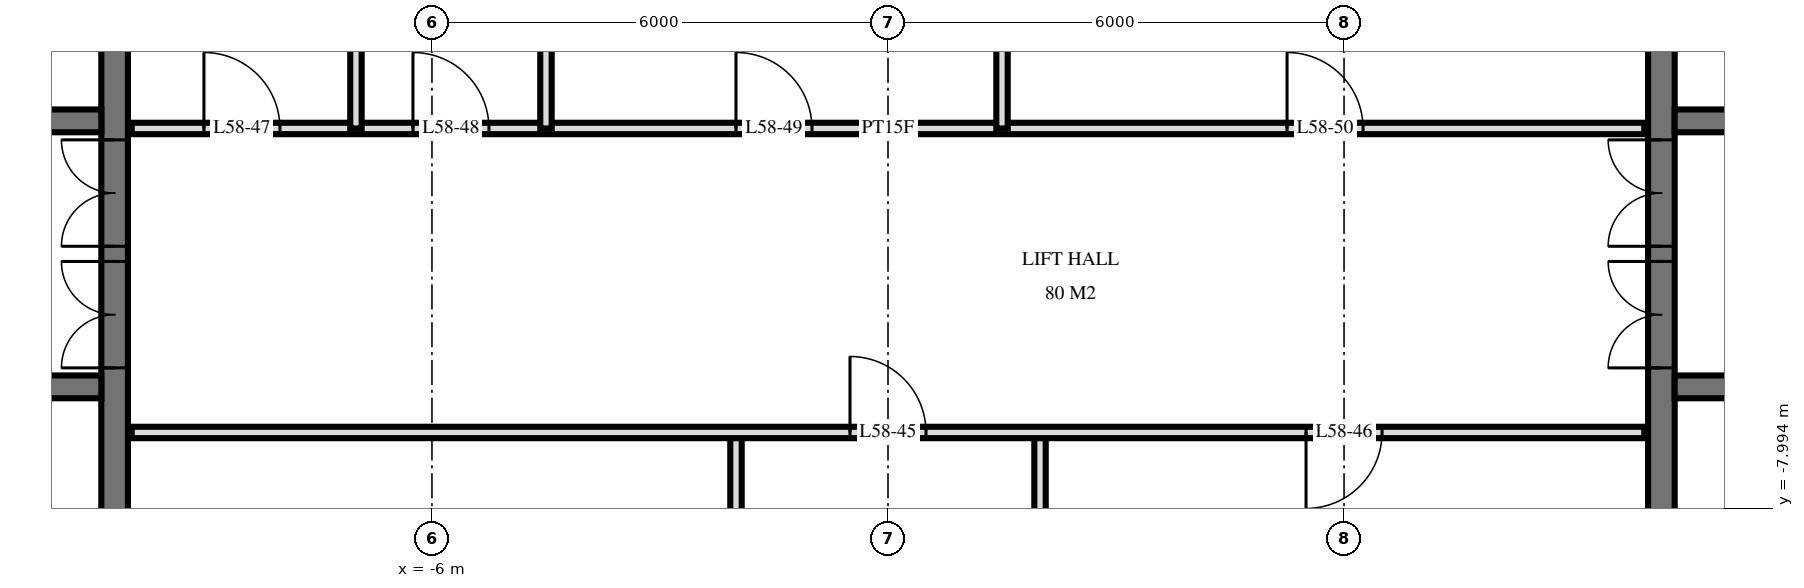
"""IFC4 building model, lengths in metres.
Left out: names, types, materials, properties, quantities, classifications, styles, units other than length and angle.
Written with IfcOpenShell. Run it as: python <this file> out.ifc"""

import sys

from ifc_helpers import new_model, si_unit, direction, frame, frame_2d, origin, place, context, subcontext, project, spatial, rectangle, extrude, element, fill, save


model = new_model("IFC4")
c1 = context("Model", 3, precision=1e-05, world=origin(), true_north=direction((0.0, 1.0)))
c2 = subcontext(c1, "Body", "Model", "MODEL_VIEW")
j1 = project(units=[si_unit("LENGTHUNIT", "METRE"), si_unit("PLANEANGLEUNIT", "RADIAN")], contexts=[c1])
p1 = place(None, origin())
s1 = spatial("IfcSite", under=j1, at=p1, CompositionType="ELEMENT")
p2 = place(p1, origin())
s2 = spatial("IfcBuilding", under=s1, at=p2, CompositionType="ELEMENT")
p3 = place(p2, frame((0.0, 0.0, 222.1)))
s3 = spatial("IfcBuildingStorey", under=s2, at=p3, CompositionType="ELEMENT", Elevation=222.1)
p4 = place(p3, frame((-10.175, -14.55, 0.0), z_axis=(0.0, 0.0, 1.0), x_axis=(0.0, 1.0, 0.0)))
e1 = element("IfcWall", 1, at=p4, inside=s3, PredefinedType="SHEAR", context=c2, shape_type="SweptSolid", body=[
    extrude(rectangle(XDim=14.1, YDim=0.35, at=frame_2d((7.05, 0.0))), origin(), (0.0, 0.0, 1.0), 3.5),
])
p5 = place(p4, frame((8.4, 0.0, 0.0)))
e2 = element("IfcOpeningElement", 2, at=p5, cuts=e1, PredefinedType="OPENING", context=c2, shape_type="SweptSolid", body=[
    extrude(rectangle(XDim=1.4, YDim=2.4, at=frame_2d((0.7, 1.2))), frame((0.0, 0.185, 0.0), z_axis=(0.0, -1.0, 0.0), x_axis=(1.0, 0.0, 0.0)), (0.0, 0.0, 1.0), 0.37),
])
p6 = place(p4, frame((10.0, 0.0, 0.0)))
e3 = element("IfcOpeningElement", 3, at=p6, cuts=e1, PredefinedType="OPENING", context=c2, shape_type="SweptSolid", body=[
    extrude(rectangle(XDim=1.4, YDim=2.4, at=frame_2d((0.7, 1.2))), frame((0.0, 0.185, 0.0), z_axis=(0.0, -1.0, 0.0), x_axis=(1.0, 0.0, 0.0)), (0.0, 0.0, 1.0), 0.37),
])
p7 = place(p4, frame((4.0, 0.0, 0.0)))
e4 = element("IfcOpeningElement", 4, at=p7, cuts=e1, PredefinedType="OPENING", context=c2, shape_type="SweptSolid", body=[
    extrude(rectangle(XDim=1.2, YDim=2.1, at=frame_2d((0.6, 1.05))), frame((0.0, 0.185, 0.0), z_axis=(0.0, -1.0, 0.0), x_axis=(1.0, 0.0, 0.0)), (0.0, 0.0, 1.0), 0.37),
])
p8 = place(p3, frame((-24.05, -2.9, 0.0), z_axis=(0.0, 0.0, 1.0), x_axis=(1.0, 0.0, 0.0)))
e5 = element("IfcWall", 5, at=p8, inside=s3, PredefinedType="SHEAR", context=c2, shape_type="SweptSolid", body=[
    extrude(rectangle(XDim=13.7, YDim=0.3, at=frame_2d((6.85, 0.0))), origin(), (0.0, 0.0, 1.0), 3.5),
])
p9 = place(p8, frame((0.55, 0.0, 0.0)))
e6 = element("IfcOpeningElement", 6, at=p9, cuts=e5, PredefinedType="OPENING", context=c2, shape_type="SweptSolid", body=[
    extrude(rectangle(XDim=1.1, YDim=2.1, at=frame_2d((0.55, 1.05))), frame((0.0, 0.16, 0.0), z_axis=(0.0, -1.0, 0.0), x_axis=(1.0, 0.0, 0.0)), (0.0, 0.0, 1.0), 0.32),
])
p10 = place(p8, frame((5.9, 0.0, 0.0)))
e7 = element("IfcOpeningElement", 7, at=p10, cuts=e5, PredefinedType="OPENING", context=c2, shape_type="SweptSolid", body=[
    extrude(rectangle(XDim=0.9, YDim=2.1, at=frame_2d((0.45, 1.05))), frame((0.0, 0.16, 0.0), z_axis=(0.0, -1.0, 0.0), x_axis=(1.0, 0.0, 0.0)), (0.0, 0.0, 1.0), 0.32),
])
p11 = place(p8, frame((11.85, 0.0, 0.0)))
e8 = element("IfcOpeningElement", 8, at=p11, cuts=e5, PredefinedType="OPENING", context=c2, shape_type="SweptSolid", body=[
    extrude(rectangle(XDim=1.0, YDim=2.1, at=frame_2d((0.5, 1.05))), frame((0.0, 0.16, 0.0), z_axis=(0.0, -1.0, 0.0), x_axis=(1.0, 0.0, 0.0)), (0.0, 0.0, 1.0), 0.32),
])
p12 = place(p8, frame((9.312, 0.0, 0.0)))
e9 = element("IfcOpeningElement", 9, at=p12, cuts=e5, PredefinedType="OPENING", context=c2, shape_type="SweptSolid", body=[
    extrude(rectangle(XDim=1.0, YDim=2.1, at=frame_2d((0.5, 1.05))), frame((0.0, 0.16, 0.0), z_axis=(0.0, -1.0, 0.0), x_axis=(1.0, 0.0, 0.0)), (0.0, 0.0, 1.0), 0.32),
])
p13 = place(p8, frame((7.887, 0.0, 0.0)))
e10 = element("IfcOpeningElement", 10, at=p13, cuts=e5, PredefinedType="OPENING", context=c2, shape_type="SweptSolid", body=[
    extrude(rectangle(XDim=1.0, YDim=2.1, at=frame_2d((0.5, 1.05))), frame((0.0, 0.16, 0.0), z_axis=(0.0, -1.0, 0.0), x_axis=(1.0, 0.0, 0.0)), (0.0, 0.0, 1.0), 0.32),
])
p14 = place(p8, frame((3.0, 0.0, 0.0)))
e11 = element("IfcOpeningElement", 11, at=p14, cuts=e5, PredefinedType="OPENING", context=c2, shape_type="SweptSolid", body=[
    extrude(rectangle(XDim=1.0, YDim=2.1, at=frame_2d((0.5, 1.05))), frame((0.0, 0.16, 0.0), z_axis=(0.0, -1.0, 0.0), x_axis=(1.0, 0.0, 0.0)), (0.0, 0.0, 1.0), 0.32),
])
p15 = place(p3, frame((-24.05, -6.4, 0.0), z_axis=(0.0, 0.0, 1.0), x_axis=(1.0, 0.0, 0.0)))
e12 = element("IfcWall", 12, at=p15, inside=s3, PredefinedType="SHEAR", context=c2, shape_type="SweptSolid", body=[
    extrude(rectangle(XDim=13.7, YDim=0.3, at=frame_2d((6.85, 0.0))), origin(), (0.0, 0.0, 1.0), 3.5),
])
p16 = place(p15, frame((0.55, 0.0, 0.0)))
e13 = element("IfcOpeningElement", 13, at=p16, cuts=e12, PredefinedType="OPENING", context=c2, shape_type="SweptSolid", body=[
    extrude(rectangle(XDim=1.1, YDim=2.1, at=frame_2d((0.55, 1.05))), frame((0.0, 0.16, 0.0), z_axis=(0.0, -1.0, 0.0), x_axis=(1.0, 0.0, 0.0)), (0.0, 0.0, 1.0), 0.32),
])
p17 = place(p15, frame((5.8, 0.0, 0.0)))
e14 = element("IfcOpeningElement", 14, at=p17, cuts=e12, PredefinedType="OPENING", context=c2, shape_type="SweptSolid", body=[
    extrude(rectangle(XDim=1.1, YDim=2.1, at=frame_2d((0.55, 1.05))), frame((0.0, 0.16, 0.0), z_axis=(0.0, -1.0, 0.0), x_axis=(1.0, 0.0, 0.0)), (0.0, 0.0, 1.0), 0.32),
])
p18 = place(p3, frame((10.175, -14.55, 0.0), z_axis=(0.0, 0.0, 1.0), x_axis=(0.0, 1.0, 0.0)))
e15 = element("IfcWall", 15, at=p18, inside=s3, PredefinedType="SHEAR", context=c2, shape_type="SweptSolid", body=[
    extrude(rectangle(XDim=14.1, YDim=0.35, at=frame_2d((7.05, 0.0))), origin(), (0.0, 0.0, 1.0), 3.5),
])
p19 = place(p18, frame((8.4, 0.0, 0.0)))
e16 = element("IfcOpeningElement", 16, at=p19, cuts=e15, PredefinedType="OPENING", context=c2, shape_type="SweptSolid", body=[
    extrude(rectangle(XDim=1.4, YDim=2.4, at=frame_2d((0.7, 1.2))), frame((0.0, 0.185, 0.0), z_axis=(0.0, -1.0, 0.0), x_axis=(1.0, 0.0, 0.0)), (0.0, 0.0, 1.0), 0.37),
])
p20 = place(p18, frame((10.0, 0.0, 0.0)))
e17 = element("IfcOpeningElement", 17, at=p20, cuts=e15, PredefinedType="OPENING", context=c2, shape_type="SweptSolid", body=[
    extrude(rectangle(XDim=1.4, YDim=2.4, at=frame_2d((0.7, 1.2))), frame((0.0, 0.185, 0.0), z_axis=(0.0, -1.0, 0.0), x_axis=(1.0, 0.0, 0.0)), (0.0, 0.0, 1.0), 0.37),
])
p21 = place(p18, frame((4.0, 0.0, 0.0)))
e18 = element("IfcOpeningElement", 18, at=p21, cuts=e15, PredefinedType="OPENING", context=c2, shape_type="SweptSolid", body=[
    extrude(rectangle(XDim=1.2, YDim=2.1, at=frame_2d((0.6, 1.05))), frame((0.0, 0.185, 0.0), z_axis=(0.0, -1.0, 0.0), x_axis=(1.0, 0.0, 0.0)), (0.0, 0.0, 1.0), 0.37),
])
p22 = place(p3, frame((10.35, -2.9, 0.0), z_axis=(0.0, 0.0, 1.0), x_axis=(1.0, 0.0, 0.0)))
e19 = element("IfcWall", 19, at=p22, inside=s3, PredefinedType="SHEAR", context=c2, shape_type="SweptSolid", body=[
    extrude(rectangle(XDim=13.7, YDim=0.3, at=frame_2d((6.85, 0.0))), origin(), (0.0, 0.0, 1.0), 3.5),
])
p23 = place(p22, frame((12.05, 0.0, 0.0)))
e20 = element("IfcOpeningElement", 20, at=p23, cuts=e19, PredefinedType="OPENING", context=c2, shape_type="SweptSolid", body=[
    extrude(rectangle(XDim=1.1, YDim=2.1, at=frame_2d((0.55, 1.05))), frame((0.0, 0.16, 0.0), z_axis=(0.0, -1.0, 0.0), x_axis=(1.0, 0.0, 0.0)), (0.0, 0.0, 1.0), 0.32),
])
p24 = place(p22, frame((6.9, 0.0, 0.0)))
e21 = element("IfcOpeningElement", 21, at=p24, cuts=e19, PredefinedType="OPENING", context=c2, shape_type="SweptSolid", body=[
    extrude(rectangle(XDim=0.9, YDim=2.1, at=frame_2d((0.45, 1.05))), frame((0.0, 0.16, 0.0), z_axis=(0.0, -1.0, 0.0), x_axis=(1.0, 0.0, 0.0)), (0.0, 0.0, 1.0), 0.32),
])
p25 = place(p22, frame((0.85, 0.0, 0.0)))
e22 = element("IfcOpeningElement", 22, at=p25, cuts=e19, PredefinedType="OPENING", context=c2, shape_type="SweptSolid", body=[
    extrude(rectangle(XDim=1.0, YDim=2.1, at=frame_2d((0.5, 1.05))), frame((0.0, 0.16, 0.0), z_axis=(0.0, -1.0, 0.0), x_axis=(1.0, 0.0, 0.0)), (0.0, 0.0, 1.0), 0.32),
])
p26 = place(p22, frame((3.387, 0.0, 0.0)))
e23 = element("IfcOpeningElement", 23, at=p26, cuts=e19, PredefinedType="OPENING", context=c2, shape_type="SweptSolid", body=[
    extrude(rectangle(XDim=1.0, YDim=2.1, at=frame_2d((0.5, 1.05))), frame((0.0, 0.16, 0.0), z_axis=(0.0, -1.0, 0.0), x_axis=(1.0, 0.0, 0.0)), (0.0, 0.0, 1.0), 0.32),
])
p27 = place(p22, frame((4.812, 0.0, 0.0)))
e24 = element("IfcOpeningElement", 24, at=p27, cuts=e19, PredefinedType="OPENING", context=c2, shape_type="SweptSolid", body=[
    extrude(rectangle(XDim=1.0, YDim=2.1, at=frame_2d((0.5, 1.05))), frame((0.0, 0.16, 0.0), z_axis=(0.0, -1.0, 0.0), x_axis=(1.0, 0.0, 0.0)), (0.0, 0.0, 1.0), 0.32),
])
p28 = place(p22, frame((9.7, 0.0, 0.0)))
e25 = element("IfcOpeningElement", 25, at=p28, cuts=e19, PredefinedType="OPENING", context=c2, shape_type="SweptSolid", body=[
    extrude(rectangle(XDim=1.0, YDim=2.1, at=frame_2d((0.5, 1.05))), frame((0.0, 0.16, 0.0), z_axis=(0.0, -1.0, 0.0), x_axis=(1.0, 0.0, 0.0)), (0.0, 0.0, 1.0), 0.32),
])
p29 = place(p3, frame((10.35, -6.4, 0.0), z_axis=(0.0, 0.0, 1.0), x_axis=(1.0, 0.0, 0.0)))
e26 = element("IfcWall", 26, at=p29, inside=s3, PredefinedType="SHEAR", context=c2, shape_type="SweptSolid", body=[
    extrude(rectangle(XDim=13.7, YDim=0.3, at=frame_2d((6.85, 0.0))), origin(), (0.0, 0.0, 1.0), 3.5),
])
p30 = place(p29, frame((12.05, 0.0, 0.0)))
e27 = element("IfcOpeningElement", 27, at=p30, cuts=e26, PredefinedType="OPENING", context=c2, shape_type="SweptSolid", body=[
    extrude(rectangle(XDim=1.1, YDim=2.1, at=frame_2d((0.55, 1.05))), frame((0.0, 0.16, 0.0), z_axis=(0.0, -1.0, 0.0), x_axis=(1.0, 0.0, 0.0)), (0.0, 0.0, 1.0), 0.32),
])
p31 = place(p29, frame((6.8, 0.0, 0.0)))
e28 = element("IfcOpeningElement", 28, at=p31, cuts=e26, PredefinedType="OPENING", context=c2, shape_type="SweptSolid", body=[
    extrude(rectangle(XDim=1.1, YDim=2.1, at=frame_2d((0.55, 1.05))), frame((0.0, 0.16, 0.0), z_axis=(0.0, -1.0, 0.0), x_axis=(1.0, 0.0, 0.0)), (0.0, 0.0, 1.0), 0.32),
])
p32 = place(p3, frame((2.0, -11.0, 0.0), z_axis=(0.0, 0.0, 1.0), x_axis=(0.0, 1.0, 0.0)))
e29 = element("IfcWall", 29, at=p32, inside=s3, PredefinedType="PARTITIONING", context=c2, shape_type="SweptSolid", body=[
    extrude(rectangle(XDim=4.0, YDim=0.15, at=frame_2d((2.0, 0.0))), origin(), (0.0, 0.0, 1.0), 3.22),
])
p33 = place(p3, frame((1.5, -3.0, 0.0), z_axis=(0.0, 0.0, 1.0), x_axis=(0.0, 1.0, 0.0)))
e30 = element("IfcWall", 30, at=p33, inside=s3, PredefinedType="PARTITIONING", context=c2, shape_type="SweptSolid", body=[
    extrude(rectangle(XDim=4.02, YDim=0.15, at=frame_2d((2.01, 0.0))), origin(), (0.0, 0.0, 1.0), 3.22),
])
p34 = place(p3, frame((-2.0, -11.0, 0.0), z_axis=(0.0, 0.0, 1.0), x_axis=(0.0, 1.0, 0.0)))
e31 = element("IfcWall", 31, at=p34, inside=s3, PredefinedType="PARTITIONING", context=c2, shape_type="SweptSolid", body=[
    extrude(rectangle(XDim=4.0, YDim=0.15, at=frame_2d((2.0, 0.0))), origin(), (0.0, 0.0, 1.0), 3.22),
])
for number, where, z_axis, x_axis in (
    (32, (-4.5, -3.0, 0.0), (0.0, 0.0, 1.0), (0.0, 1.0, 0.0)),
    (33, (-7.0, -3.0, 0.0), (0.0, 0.0, 1.0), (0.0, 1.0, 0.0)),
):
    element("IfcWall", number, at=place(p3, frame(where, z_axis=z_axis, x_axis=x_axis)), inside=s3, PredefinedType="PLUMBINGWALL", context=c2, shape_type="SweptSolid", body=[
        extrude(rectangle(XDim=4.02, YDim=0.15, at=frame_2d((2.01, 0.0))), origin(), (0.0, 0.0, 1.0), 3.22),
    ])
p35 = place(p3, frame((-9.95, -7.0, 0.0), z_axis=(0.0, 0.0, 1.0), x_axis=(1.0, 0.0, 0.0)))
e34 = element("IfcWall", 34, at=p35, inside=s3, PredefinedType="PARTITIONING", context=c2, shape_type="SweptSolid", body=[
    extrude(rectangle(XDim=19.9, YDim=0.15, at=frame_2d((9.95, 0.0))), origin(), (0.0, 0.0, 1.0), 3.22),
])
p36 = place(p35, frame((9.45, 0.0, 0.0)))
e35 = element("IfcOpeningElement", 35, at=p36, cuts=e34, PredefinedType="OPENING", context=c2, shape_type="SweptSolid", body=[
    extrude(rectangle(XDim=1.0, YDim=2.1, at=frame_2d((0.5, 1.05))), frame((0.0, 0.085, 0.0), z_axis=(0.0, -1.0, 0.0), x_axis=(1.0, 0.0, 0.0)), (0.0, 0.0, 1.0), 0.17),
])
p37 = place(p35, frame((15.45, 0.0, 0.0)))
e36 = element("IfcOpeningElement", 36, at=p37, cuts=e34, PredefinedType="OPENING", context=c2, shape_type="SweptSolid", body=[
    extrude(rectangle(XDim=1.0, YDim=2.1, at=frame_2d((0.5, 1.05))), frame((0.0, 0.085, 0.0), z_axis=(0.0, -1.0, 0.0), x_axis=(1.0, 0.0, 0.0)), (0.0, 0.0, 1.0), 0.17),
])
p38 = place(p3, frame((-9.95, -3.0, 0.0), z_axis=(0.0, 0.0, 1.0), x_axis=(1.0, 0.0, 0.0)))
e37 = element("IfcWall", 37, at=p38, inside=s3, PredefinedType="PARTITIONING", context=c2, shape_type="SweptSolid", body=[
    extrude(rectangle(XDim=19.9, YDim=0.15, at=frame_2d((9.95, 0.0))), origin(), (0.0, 0.0, 1.0), 3.22),
])
p39 = place(p38, frame((0.95, 0.0, 0.0)))
e38 = element("IfcOpeningElement", 38, at=p39, cuts=e37, PredefinedType="OPENING", context=c2, shape_type="SweptSolid", body=[
    extrude(rectangle(XDim=1.0, YDim=2.1, at=frame_2d((0.5, 1.05))), frame((0.0, 0.085, 0.0), z_axis=(0.0, -1.0, 0.0), x_axis=(1.0, 0.0, 0.0)), (0.0, 0.0, 1.0), 0.17),
])
p40 = place(p38, frame((3.7, 0.0, 0.0)))
e39 = element("IfcOpeningElement", 39, at=p40, cuts=e37, PredefinedType="OPENING", context=c2, shape_type="SweptSolid", body=[
    extrude(rectangle(XDim=1.0, YDim=2.1, at=frame_2d((0.5, 1.05))), frame((0.0, 0.085, 0.0), z_axis=(0.0, -1.0, 0.0), x_axis=(1.0, 0.0, 0.0)), (0.0, 0.0, 1.0), 0.17),
])
p41 = place(p38, frame((7.95, 0.0, 0.0)))
e40 = element("IfcOpeningElement", 40, at=p41, cuts=e37, PredefinedType="OPENING", context=c2, shape_type="SweptSolid", body=[
    extrude(rectangle(XDim=1.0, YDim=2.1, at=frame_2d((0.5, 1.05))), frame((0.0, 0.085, 0.0), z_axis=(0.0, -1.0, 0.0), x_axis=(1.0, 0.0, 0.0)), (0.0, 0.0, 1.0), 0.17),
])
p42 = place(p38, frame((15.2, 0.0, 0.0)))
e41 = element("IfcOpeningElement", 41, at=p42, cuts=e37, PredefinedType="OPENING", context=c2, shape_type="SweptSolid", body=[
    extrude(rectangle(XDim=1.0, YDim=2.1, at=frame_2d((0.5, 1.05))), frame((0.0, 0.085, 0.0), z_axis=(0.0, -1.0, 0.0), x_axis=(1.0, 0.0, 0.0)), (0.0, 0.0, 1.0), 0.17),
])
p43 = place(p5, origin())
e42 = element("IfcDoor", 42, at=p43, inside=s3, OperationType="DOUBLE_DOOR_SINGLE_SWING", PredefinedType="DOOR", context=c2, shape_type="SweptSolid", body=[
    extrude(rectangle(XDim=1.4, YDim=2.4, at=frame_2d((0.7, 1.2))), frame((0.0, 0.025, 0.0), z_axis=(0.0, -1.0, 0.0), x_axis=(1.0, 0.0, 0.0)), (0.0, 0.0, 1.0), 0.05),
])
fill(e2, e42)
p44 = place(p6, origin())
e43 = element("IfcDoor", 43, at=p44, inside=s3, OperationType="DOUBLE_DOOR_SINGLE_SWING", PredefinedType="DOOR", context=c2, shape_type="SweptSolid", body=[
    extrude(rectangle(XDim=1.4, YDim=2.4, at=frame_2d((0.7, 1.2))), frame((0.0, 0.025, 0.0), z_axis=(0.0, -1.0, 0.0), x_axis=(1.0, 0.0, 0.0)), (0.0, 0.0, 1.0), 0.05),
])
fill(e3, e43)
p45 = place(p19, origin())
e44 = element("IfcDoor", 44, at=p45, inside=s3, OperationType="DOUBLE_DOOR_SINGLE_SWING", PredefinedType="DOOR", context=c2, shape_type="SweptSolid", body=[
    extrude(rectangle(XDim=1.4, YDim=2.4, at=frame_2d((0.7, 1.2))), frame((0.0, 0.025, 0.0), z_axis=(0.0, -1.0, 0.0), x_axis=(1.0, 0.0, 0.0)), (0.0, 0.0, 1.0), 0.05),
])
fill(e16, e44)
p46 = place(p20, origin())
e45 = element("IfcDoor", 45, at=p46, inside=s3, OperationType="DOUBLE_DOOR_SINGLE_SWING", PredefinedType="DOOR", context=c2, shape_type="SweptSolid", body=[
    extrude(rectangle(XDim=1.4, YDim=2.4, at=frame_2d((0.7, 1.2))), frame((0.0, 0.025, 0.0), z_axis=(0.0, -1.0, 0.0), x_axis=(1.0, 0.0, 0.0)), (0.0, 0.0, 1.0), 0.05),
])
fill(e17, e45)
p47 = place(p36, origin())
e46 = element("IfcDoor", 46, at=p47, inside=s3, OperationType="SINGLE_SWING_RIGHT", PredefinedType="DOOR", context=c2, shape_type="SweptSolid", body=[
    extrude(rectangle(XDim=1.0, YDim=2.1, at=frame_2d((0.5, 1.05))), frame((0.0, 0.025, 0.0), z_axis=(0.0, -1.0, 0.0), x_axis=(1.0, 0.0, 0.0)), (0.0, 0.0, 1.0), 0.05),
])
fill(e35, e46)
p48 = place(p37, frame((0.5, 0.0, 0.0), z_axis=(0.0, 0.0, 1.0), x_axis=(-1.0, 0.0, 0.0)))
e47 = element("IfcDoor", 47, at=p48, inside=s3, OperationType="SINGLE_SWING_LEFT", PredefinedType="DOOR", context=c2, shape_type="SweptSolid", body=[
    extrude(rectangle(XDim=1.0, YDim=2.1, at=frame_2d((0.0, 1.05))), frame((0.0, -0.025, 0.0), z_axis=(0.0, 1.0, 0.0), x_axis=(-1.0, 0.0, 0.0)), (0.0, 0.0, 1.0), 0.05),
])
fill(e36, e47)
p49 = place(p39, origin())
e48 = element("IfcDoor", 48, at=p49, inside=s3, OperationType="SINGLE_SWING_RIGHT", PredefinedType="DOOR", context=c2, shape_type="SweptSolid", body=[
    extrude(rectangle(XDim=1.0, YDim=2.1, at=frame_2d((0.5, 1.05))), frame((0.0, 0.025, 0.0), z_axis=(0.0, -1.0, 0.0), x_axis=(1.0, 0.0, 0.0)), (0.0, 0.0, 1.0), 0.05),
])
fill(e38, e48)
p50 = place(p40, origin())
e49 = element("IfcDoor", 49, at=p50, inside=s3, OperationType="SINGLE_SWING_RIGHT", PredefinedType="DOOR", context=c2, shape_type="SweptSolid", body=[
    extrude(rectangle(XDim=1.0, YDim=2.1, at=frame_2d((0.5, 1.05))), frame((0.0, 0.025, 0.0), z_axis=(0.0, -1.0, 0.0), x_axis=(1.0, 0.0, 0.0)), (0.0, 0.0, 1.0), 0.05),
])
fill(e39, e49)
p51 = place(p41, origin())
e50 = element("IfcDoor", 50, at=p51, inside=s3, OperationType="SINGLE_SWING_RIGHT", PredefinedType="DOOR", context=c2, shape_type="SweptSolid", body=[
    extrude(rectangle(XDim=1.0, YDim=2.1, at=frame_2d((0.5, 1.05))), frame((0.0, 0.025, 0.0), z_axis=(0.0, -1.0, 0.0), x_axis=(1.0, 0.0, 0.0)), (0.0, 0.0, 1.0), 0.05),
])
fill(e40, e50)
p52 = place(p42, origin())
e51 = element("IfcDoor", 51, at=p52, inside=s3, OperationType="SINGLE_SWING_RIGHT", PredefinedType="DOOR", context=c2, shape_type="SweptSolid", body=[
    extrude(rectangle(XDim=1.0, YDim=2.1, at=frame_2d((0.5, 1.05))), frame((0.0, 0.025, 0.0), z_axis=(0.0, -1.0, 0.0), x_axis=(1.0, 0.0, 0.0)), (0.0, 0.0, 1.0), 0.05),
])
fill(e41, e51)
save(model, sys.argv[1])
